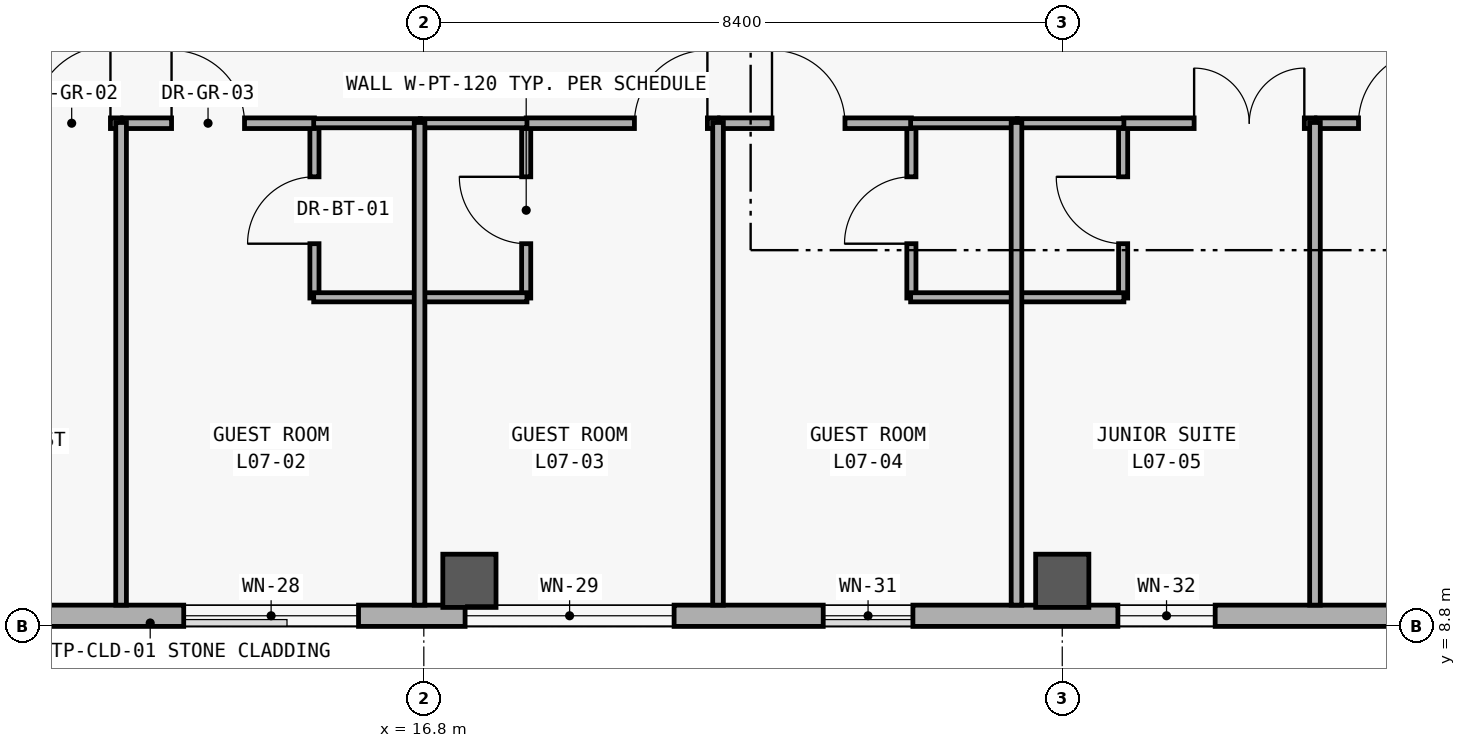
"""IFC4 building model, lengths in metres.
Left out: names, types, materials, properties, quantities, classifications, styles, units other than length and angle.
Written with IfcOpenShell. Run it as: python <this file> out.ifc"""

import sys

from ifc_helpers import new_model, si_unit, direction, frame, frame_2d, origin, origin_2d, place, context, subcontext, project, spatial, rectangle, extrude, element, fill, save


model = new_model("IFC4")
c1 = context("Model", 3, precision=1e-05, world=origin(), true_north=direction((0.0, 1.0)))
c2 = subcontext(c1, "Body", "Model", "MODEL_VIEW")
j1 = project(units=[si_unit("LENGTHUNIT", "METRE"), si_unit("PLANEANGLEUNIT", "RADIAN")], contexts=[c1])
p1 = place(None, origin())
s1 = spatial("IfcSite", under=j1, at=p1, CompositionType="ELEMENT")
p2 = place(p1, origin())
s2 = spatial("IfcBuilding", under=s1, at=p2, CompositionType="ELEMENT")
p3 = place(p2, frame((0.0, 0.0, 30.0)))
s3 = spatial("IfcBuildingStorey", under=s2, at=p3, CompositionType="ELEMENT", Elevation=30.0)
for number, where, z_axis, x_axis in (
    (1, (17.4, 9.4, 0.0), (0.0, 0.0, 1.0), (1.0, 0.0, 0.0)),
    (2, (25.2, 9.4, 0.0), (0.0, 0.0, 1.0), (1.0, 0.0, 0.0)),
):
    element("IfcColumn", number, at=place(p3, frame(where, z_axis=z_axis, x_axis=x_axis)), inside=s3, PredefinedType="COLUMN", context=c2, shape_type="SweptSolid", body=[
        extrude(rectangle(XDim=0.7, YDim=0.7, at=origin_2d()), origin(), (0.0, 0.0, 1.0), 3.6),
    ])
p4 = place(p3, frame((75.32, 8.94, 0.0), z_axis=(0.0, 0.0, 1.0), x_axis=(-1.0, 0.0, 0.0)))
e3 = element("IfcWall", 3, at=p4, inside=s3, PredefinedType="SOLIDWALL", context=c2, shape_type="SweptSolid", body=[
    extrude(rectangle(XDim=66.64, YDim=0.28, at=frame_2d((33.32, 0.0))), origin(), (0.0, 0.0, 1.0), 3.34),
])
p5 = place(p4, frame((6.47, 0.0, 0.85)))
e4 = element("IfcOpeningElement", 4, at=p5, cuts=e3, PredefinedType="OPENING", context=c2, shape_type="SweptSolid", body=[
    extrude(rectangle(XDim=2.4, YDim=1.8, at=frame_2d((1.2, 0.9))), frame((0.0, 0.15, 0.0), z_axis=(0.0, -1.0, 0.0), x_axis=(1.0, 0.0, 0.0)), (0.0, 0.0, 1.0), 0.3),
])
p6 = place(p4, frame((63.606, 0.0, 0.85)))
e5 = element("IfcOpeningElement", 5, at=p6, cuts=e3, PredefinedType="OPENING", context=c2, shape_type="SweptSolid", body=[
    extrude(rectangle(XDim=1.7, YDim=2.0, at=frame_2d((0.85, 1.0))), frame((0.0, 0.15, 0.0), z_axis=(0.0, -1.0, 0.0), x_axis=(1.0, 0.0, 0.0)), (0.0, 0.0, 1.0), 0.3),
])
p7 = place(p4, frame((59.379, 0.0, 0.85)))
e6 = element("IfcOpeningElement", 6, at=p7, cuts=e3, PredefinedType="OPENING", context=c2, shape_type="SweptSolid", body=[
    extrude(rectangle(XDim=2.3, YDim=2.05, at=frame_2d((1.15, 1.025))), frame((0.0, 0.15, 0.0), z_axis=(0.0, -1.0, 0.0), x_axis=(1.0, 0.0, 0.0)), (0.0, 0.0, 1.0), 0.3),
])
p8 = place(p4, frame((55.227, 0.0, 0.85)))
e7 = element("IfcOpeningElement", 7, at=p8, cuts=e3, PredefinedType="OPENING", context=c2, shape_type="SweptSolid", body=[
    extrude(rectangle(XDim=2.75, YDim=2.1, at=frame_2d((1.375, 1.05))), frame((0.0, 0.15, 0.0), z_axis=(0.0, -1.0, 0.0), x_axis=(1.0, 0.0, 0.0)), (0.0, 0.0, 1.0), 0.3),
])
p9 = place(p4, frame((52.085, 0.0, 0.85)))
e8 = element("IfcOpeningElement", 8, at=p9, cuts=e3, PredefinedType="OPENING", context=c2, shape_type="SweptSolid", body=[
    extrude(rectangle(XDim=1.18, YDim=1.5, at=frame_2d((0.59, 0.75))), frame((0.0, 0.15, 0.0), z_axis=(0.0, -1.0, 0.0), x_axis=(1.0, 0.0, 0.0)), (0.0, 0.0, 1.0), 0.3),
])
p10 = place(p4, frame((48.108, 0.0, 0.85)))
e9 = element("IfcOpeningElement", 9, at=p10, cuts=e3, PredefinedType="OPENING", context=c2, shape_type="SweptSolid", body=[
    extrude(rectangle(XDim=1.28, YDim=1.6, at=frame_2d((0.64, 0.8))), frame((0.0, 0.15, 0.0), z_axis=(0.0, -1.0, 0.0), x_axis=(1.0, 0.0, 0.0)), (0.0, 0.0, 1.0), 0.3),
])
p11 = place(p4, frame((44.131, 0.0, 0.85)))
e10 = element("IfcOpeningElement", 10, at=p11, cuts=e3, PredefinedType="OPENING", context=c2, shape_type="SweptSolid", body=[
    extrude(rectangle(XDim=1.38, YDim=1.7, at=frame_2d((0.69, 0.85))), frame((0.0, 0.15, 0.0), z_axis=(0.0, -1.0, 0.0), x_axis=(1.0, 0.0, 0.0)), (0.0, 0.0, 1.0), 0.3),
])
p12 = place(p4, frame((40.155, 0.0, 0.85)))
e11 = element("IfcOpeningElement", 11, at=p12, cuts=e3, PredefinedType="OPENING", context=c2, shape_type="SweptSolid", body=[
    extrude(rectangle(XDim=1.48, YDim=1.8, at=frame_2d((0.74, 0.9))), frame((0.0, 0.15, 0.0), z_axis=(0.0, -1.0, 0.0), x_axis=(1.0, 0.0, 0.0)), (0.0, 0.0, 1.0), 0.3),
])
p13 = place(p4, frame((36.178, 0.0, 0.85)))
e12 = element("IfcOpeningElement", 12, at=p13, cuts=e3, PredefinedType="OPENING", context=c2, shape_type="SweptSolid", body=[
    extrude(rectangle(XDim=1.58, YDim=1.85, at=frame_2d((0.79, 0.925))), frame((0.0, 0.15, 0.0), z_axis=(0.0, -1.0, 0.0), x_axis=(1.0, 0.0, 0.0)), (0.0, 0.0, 1.0), 0.3),
])
p14 = place(p4, frame((32.201, 0.0, 0.85)))
e13 = element("IfcOpeningElement", 13, at=p14, cuts=e3, PredefinedType="OPENING", context=c2, shape_type="SweptSolid", body=[
    extrude(rectangle(XDim=1.68, YDim=1.9, at=frame_2d((0.84, 0.95))), frame((0.0, 0.15, 0.0), z_axis=(0.0, -1.0, 0.0), x_axis=(1.0, 0.0, 0.0)), (0.0, 0.0, 1.0), 0.3),
])
p15 = place(p4, frame((28.224, 0.0, 0.85)))
e14 = element("IfcOpeningElement", 14, at=p15, cuts=e3, PredefinedType="OPENING", context=c2, shape_type="SweptSolid", body=[
    extrude(rectangle(XDim=1.78, YDim=1.95, at=frame_2d((0.89, 0.975))), frame((0.0, 0.15, 0.0), z_axis=(0.0, -1.0, 0.0), x_axis=(1.0, 0.0, 0.0)), (0.0, 0.0, 1.0), 0.3),
])
p16 = place(p4, frame((24.247, 0.0, 0.85)))
e15 = element("IfcOpeningElement", 15, at=p16, cuts=e3, PredefinedType="OPENING", context=c2, shape_type="SweptSolid", body=[
    extrude(rectangle(XDim=1.88, YDim=1.95, at=frame_2d((0.94, 0.975))), frame((0.0, 0.15, 0.0), z_axis=(0.0, -1.0, 0.0), x_axis=(1.0, 0.0, 0.0)), (0.0, 0.0, 1.0), 0.3),
])
p17 = place(p4, frame((20.235, 0.0, 0.85)))
e16 = element("IfcOpeningElement", 16, at=p17, cuts=e3, PredefinedType="OPENING", context=c2, shape_type="SweptSolid", body=[
    extrude(rectangle(XDim=2.05, YDim=1.95, at=frame_2d((1.025, 0.975))), frame((0.0, 0.15, 0.0), z_axis=(0.0, -1.0, 0.0), x_axis=(1.0, 0.0, 0.0)), (0.0, 0.0, 1.0), 0.3),
])
p18 = place(p4, frame((16.243, 0.0, 0.85)))
e17 = element("IfcOpeningElement", 17, at=p18, cuts=e3, PredefinedType="OPENING", context=c2, shape_type="SweptSolid", body=[
    extrude(rectangle(XDim=2.18, YDim=1.95, at=frame_2d((1.09, 0.975))), frame((0.0, 0.15, 0.0), z_axis=(0.0, -1.0, 0.0), x_axis=(1.0, 0.0, 0.0)), (0.0, 0.0, 1.0), 0.3),
])
p19 = place(p3, frame((15.361, 13.12, 0.0), z_axis=(0.0, 0.0, 1.0), x_axis=(0.0, 1.0, 0.0)))
e18 = element("IfcWall", 18, at=p19, inside=s3, PredefinedType="PARTITIONING", context=c2, shape_type="SweptSolid", body=[
    extrude(rectangle(XDim=2.31, YDim=0.12, at=frame_2d((1.155, 0.0))), origin(), (0.0, 0.0, 1.0), 2.48),
])
p20 = place(p19, frame((0.715, 0.0, 0.0)))
e19 = element("IfcOpeningElement", 19, at=p20, cuts=e18, PredefinedType="OPENING", context=c2, shape_type="SweptSolid", body=[
    extrude(rectangle(XDim=0.88, YDim=2.15, at=frame_2d((0.44, 1.075))), frame((0.0, 0.07, 0.0), z_axis=(0.0, -1.0, 0.0), x_axis=(1.0, 0.0, 0.0)), (0.0, 0.0, 1.0), 0.14),
])
p21 = place(p3, frame((18.147, 13.12, 0.0), z_axis=(0.0, 0.0, 1.0), x_axis=(0.0, 1.0, 0.0)))
e20 = element("IfcWall", 20, at=p21, inside=s3, PredefinedType="PARTITIONING", context=c2, shape_type="SweptSolid", body=[
    extrude(rectangle(XDim=2.31, YDim=0.12, at=frame_2d((1.155, 0.0))), origin(), (0.0, 0.0, 1.0), 2.48),
])
p22 = place(p21, frame((0.715, 0.0, 0.0)))
e21 = element("IfcOpeningElement", 21, at=p22, cuts=e20, PredefinedType="OPENING", context=c2, shape_type="SweptSolid", body=[
    extrude(rectangle(XDim=0.88, YDim=2.15, at=frame_2d((0.44, 1.075))), frame((0.0, 0.07, 0.0), z_axis=(0.0, -1.0, 0.0), x_axis=(1.0, 0.0, 0.0)), (0.0, 0.0, 1.0), 0.14),
])
p23 = place(p3, frame((23.215, 13.12, 0.0), z_axis=(0.0, 0.0, 1.0), x_axis=(0.0, 1.0, 0.0)))
e22 = element("IfcWall", 22, at=p23, inside=s3, PredefinedType="PARTITIONING", context=c2, shape_type="SweptSolid", body=[
    extrude(rectangle(XDim=2.31, YDim=0.12, at=frame_2d((1.155, 0.0))), origin(), (0.0, 0.0, 1.0), 2.48),
])
p24 = place(p23, frame((0.715, 0.0, 0.0)))
e23 = element("IfcOpeningElement", 23, at=p24, cuts=e22, PredefinedType="OPENING", context=c2, shape_type="SweptSolid", body=[
    extrude(rectangle(XDim=0.88, YDim=2.15, at=frame_2d((0.44, 1.075))), frame((0.0, 0.07, 0.0), z_axis=(0.0, -1.0, 0.0), x_axis=(1.0, 0.0, 0.0)), (0.0, 0.0, 1.0), 0.14),
])
p25 = place(p3, frame((26.001, 13.12, 0.0), z_axis=(0.0, 0.0, 1.0), x_axis=(0.0, 1.0, 0.0)))
e24 = element("IfcWall", 24, at=p25, inside=s3, PredefinedType="PARTITIONING", context=c2, shape_type="SweptSolid", body=[
    extrude(rectangle(XDim=2.31, YDim=0.12, at=frame_2d((1.155, 0.0))), origin(), (0.0, 0.0, 1.0), 2.48),
])
p26 = place(p25, frame((0.715, 0.0, 0.0)))
e25 = element("IfcOpeningElement", 25, at=p26, cuts=e24, PredefinedType="OPENING", context=c2, shape_type="SweptSolid", body=[
    extrude(rectangle(XDim=0.88, YDim=2.15, at=frame_2d((0.44, 1.075))), frame((0.0, 0.07, 0.0), z_axis=(0.0, -1.0, 0.0), x_axis=(1.0, 0.0, 0.0)), (0.0, 0.0, 1.0), 0.14),
])
p27 = place(p3, frame((10.293, 15.42, 0.0), z_axis=(0.0, 0.0, 1.0), x_axis=(1.0, 0.0, 0.0)))
e26 = element("IfcWall", 26, at=p27, inside=s3, PredefinedType="PARTITIONING", context=c2, shape_type="SweptSolid", body=[
    extrude(rectangle(XDim=2.524, YDim=0.14, at=frame_2d((1.262, 0.0))), origin(), (0.0, 0.0, 1.0), 2.48),
])
p28 = place(p27, frame((1.364, 0.0, 0.0)))
e27 = element("IfcOpeningElement", 27, at=p28, cuts=e26, PredefinedType="OPENING", context=c2, shape_type="SweptSolid", body=[
    extrude(rectangle(XDim=1.02, YDim=2.2, at=frame_2d((0.51, 1.1))), frame((0.0, 0.08, 0.0), z_axis=(0.0, -1.0, 0.0), x_axis=(1.0, 0.0, 0.0)), (0.0, 0.0, 1.0), 0.16),
])
p29 = place(p3, frame((12.837, 15.42, 0.0), z_axis=(0.0, 0.0, 1.0), x_axis=(1.0, 0.0, 0.0)))
e28 = element("IfcWall", 28, at=p29, inside=s3, PredefinedType="PARTITIONING", context=c2, shape_type="SweptSolid", body=[
    extrude(rectangle(XDim=2.524, YDim=0.14, at=frame_2d((1.262, 0.0))), origin(), (0.0, 0.0, 1.0), 2.48),
])
p30 = place(p29, frame((0.644, 0.0, 0.0)))
e29 = element("IfcOpeningElement", 29, at=p30, cuts=e28, PredefinedType="OPENING", context=c2, shape_type="SweptSolid", body=[
    extrude(rectangle(XDim=0.96, YDim=2.25, at=frame_2d((0.48, 1.125))), frame((0.0, 0.08, 0.0), z_axis=(0.0, -1.0, 0.0), x_axis=(1.0, 0.0, 0.0)), (0.0, 0.0, 1.0), 0.16),
])
p31 = place(p3, frame((18.147, 15.42, 0.0), z_axis=(0.0, 0.0, 1.0), x_axis=(1.0, 0.0, 0.0)))
e30 = element("IfcWall", 30, at=p31, inside=s3, PredefinedType="PARTITIONING", context=c2, shape_type="SweptSolid", body=[
    extrude(rectangle(XDim=2.524, YDim=0.14, at=frame_2d((1.262, 0.0))), origin(), (0.0, 0.0, 1.0), 2.48),
])
p32 = place(p31, frame((1.424, 0.0, 0.0)))
e31 = element("IfcOpeningElement", 31, at=p32, cuts=e30, PredefinedType="OPENING", context=c2, shape_type="SweptSolid", body=[
    extrude(rectangle(XDim=0.96, YDim=2.25, at=frame_2d((0.48, 1.125))), frame((0.0, 0.08, 0.0), z_axis=(0.0, -1.0, 0.0), x_axis=(1.0, 0.0, 0.0)), (0.0, 0.0, 1.0), 0.16),
])
p33 = place(p3, frame((20.691, 15.42, 0.0), z_axis=(0.0, 0.0, 1.0), x_axis=(1.0, 0.0, 0.0)))
e32 = element("IfcWall", 32, at=p33, inside=s3, PredefinedType="PARTITIONING", context=c2, shape_type="SweptSolid", body=[
    extrude(rectangle(XDim=2.524, YDim=0.14, at=frame_2d((1.262, 0.0))), origin(), (0.0, 0.0, 1.0), 2.48),
])
p34 = place(p33, frame((0.69, 0.0, 0.0)))
e33 = element("IfcOpeningElement", 33, at=p34, cuts=e32, PredefinedType="OPENING", context=c2, shape_type="SweptSolid", body=[
    extrude(rectangle(XDim=0.96, YDim=2.25, at=frame_2d((0.48, 1.125))), frame((0.0, 0.08, 0.0), z_axis=(0.0, -1.0, 0.0), x_axis=(1.0, 0.0, 0.0)), (0.0, 0.0, 1.0), 0.16),
])
p35 = place(p3, frame((26.001, 15.42, 0.0), z_axis=(0.0, 0.0, 1.0), x_axis=(1.0, 0.0, 0.0)))
e34 = element("IfcWall", 34, at=p35, inside=s3, PredefinedType="PARTITIONING", context=c2, shape_type="SweptSolid", body=[
    extrude(rectangle(XDim=2.524, YDim=0.14, at=frame_2d((1.262, 0.0))), origin(), (0.0, 0.0, 1.0), 2.48),
])
p36 = place(p35, frame((0.934, 0.0, 0.0)))
e35 = element("IfcOpeningElement", 35, at=p36, cuts=e34, PredefinedType="OPENING", context=c2, shape_type="SweptSolid", body=[
    extrude(rectangle(XDim=1.45, YDim=2.3, at=frame_2d((0.725, 1.15))), frame((0.0, 0.08, 0.0), z_axis=(0.0, -1.0, 0.0), x_axis=(1.0, 0.0, 0.0)), (0.0, 0.0, 1.0), 0.16),
])
p37 = place(p3, frame((28.545, 15.42, 0.0), z_axis=(0.0, 0.0, 1.0), x_axis=(1.0, 0.0, 0.0)))
e36 = element("IfcWall", 36, at=p37, inside=s3, PredefinedType="PARTITIONING", context=c2, shape_type="SweptSolid", body=[
    extrude(rectangle(XDim=2.524, YDim=0.14, at=frame_2d((1.262, 0.0))), origin(), (0.0, 0.0, 1.0), 2.48),
])
p38 = place(p37, frame((0.553, 0.0, 0.0)))
e37 = element("IfcOpeningElement", 37, at=p38, cuts=e36, PredefinedType="OPENING", context=c2, shape_type="SweptSolid", body=[
    extrude(rectangle(XDim=0.96, YDim=2.25, at=frame_2d((0.48, 1.125))), frame((0.0, 0.08, 0.0), z_axis=(0.0, -1.0, 0.0), x_axis=(1.0, 0.0, 0.0)), (0.0, 0.0, 1.0), 0.16),
])
for number, where, z_axis, x_axis in (
    (38, (15.351, 13.13, 0.0), (0.0, 0.0, 1.0), (1.0, 0.0, 0.0)),
    (39, (15.351, 15.42, 0.0), (0.0, 0.0, 1.0), (1.0, 0.0, 0.0)),
):
    element("IfcWall", number, at=place(p3, frame(where, z_axis=z_axis, x_axis=x_axis)), inside=s3, PredefinedType="PARTITIONING", context=c2, shape_type="SweptSolid", body=[
        extrude(rectangle(XDim=1.403, YDim=0.12, at=frame_2d((0.701, 0.0))), origin(), (0.0, 0.0, 1.0), 2.48),
    ])
for number, where, z_axis, x_axis in (
    (40, (16.754, 13.13, 0.0), (0.0, 0.0, 1.0), (1.0, 0.0, 0.0)),
    (41, (16.754, 15.42, 0.0), (0.0, 0.0, 1.0), (1.0, 0.0, 0.0)),
):
    element("IfcWall", number, at=place(p3, frame(where, z_axis=z_axis, x_axis=x_axis)), inside=s3, PredefinedType="PARTITIONING", context=c2, shape_type="SweptSolid", body=[
        extrude(rectangle(XDim=1.403, YDim=0.12, at=frame_2d((0.702, 0.0))), origin(), (0.0, 0.0, 1.0), 2.48),
    ])
for number, where, z_axis, x_axis in (
    (42, (23.205, 13.13, 0.0), (0.0, 0.0, 1.0), (1.0, 0.0, 0.0)),
    (43, (23.205, 15.42, 0.0), (0.0, 0.0, 1.0), (1.0, 0.0, 0.0)),
):
    element("IfcWall", number, at=place(p3, frame(where, z_axis=z_axis, x_axis=x_axis)), inside=s3, PredefinedType="PARTITIONING", context=c2, shape_type="SweptSolid", body=[
        extrude(rectangle(XDim=1.403, YDim=0.12, at=frame_2d((0.701, 0.0))), origin(), (0.0, 0.0, 1.0), 2.48),
    ])
for number, where, z_axis, x_axis in (
    (44, (24.608, 13.13, 0.0), (0.0, 0.0, 1.0), (1.0, 0.0, 0.0)),
    (45, (24.608, 15.42, 0.0), (0.0, 0.0, 1.0), (1.0, 0.0, 0.0)),
):
    element("IfcWall", number, at=place(p3, frame(where, z_axis=z_axis, x_axis=x_axis)), inside=s3, PredefinedType="PARTITIONING", context=c2, shape_type="SweptSolid", body=[
        extrude(rectangle(XDim=1.403, YDim=0.12, at=frame_2d((0.702, 0.0))), origin(), (0.0, 0.0, 1.0), 2.48),
    ])
for number, where, z_axis, x_axis in (
    (46, (12.817, 9.08, 0.0), (0.0, 0.0, 1.0), (0.0, 1.0, 0.0)),
    (47, (16.744, 9.08, 0.0), (0.0, 0.0, 1.0), (0.0, 1.0, 0.0)),
    (48, (20.671, 9.08, 0.0), (0.0, 0.0, 1.0), (0.0, 1.0, 0.0)),
    (49, (24.598, 9.08, 0.0), (0.0, 0.0, 1.0), (0.0, 1.0, 0.0)),
    (50, (28.525, 9.08, 0.0), (0.0, 0.0, 1.0), (0.0, 1.0, 0.0)),
):
    element("IfcWall", number, at=place(p3, frame(where, z_axis=z_axis, x_axis=x_axis)), inside=s3, PredefinedType="PARTITIONING", context=c2, shape_type="SweptSolid", body=[
        extrude(rectangle(XDim=6.35, YDim=0.14, at=frame_2d((3.175, 0.0))), origin(), (0.0, 0.0, 1.0), 2.48),
    ])
p39 = place(p7, origin())
e51 = element("IfcWindow", 51, at=p39, inside=s3, PartitioningType="SINGLE_PANEL", PredefinedType="WINDOW", context=c2, shape_type="SweptSolid", body=[
    extrude(rectangle(XDim=2.3, YDim=2.05, at=frame_2d((1.15, 1.025))), frame((0.0, 0.03, 0.0), z_axis=(0.0, -1.0, 0.0), x_axis=(1.0, 0.0, 0.0)), (0.0, 0.0, 1.0), 0.06),
])
fill(e6, e51)
p40 = place(p8, origin())
e52 = element("IfcWindow", 52, at=p40, inside=s3, PartitioningType="SINGLE_PANEL", PredefinedType="WINDOW", context=c2, shape_type="SweptSolid", body=[
    extrude(rectangle(XDim=2.75, YDim=2.1, at=frame_2d((1.375, 1.05))), frame((0.0, 0.03, 0.0), z_axis=(0.0, -1.0, 0.0), x_axis=(1.0, 0.0, 0.0)), (0.0, 0.0, 1.0), 0.06),
])
fill(e7, e52)
p41 = place(p9, origin())
e53 = element("IfcWindow", 53, at=p41, inside=s3, PartitioningType="SINGLE_PANEL", PredefinedType="WINDOW", context=c2, shape_type="SweptSolid", body=[
    extrude(rectangle(XDim=1.18, YDim=1.5, at=frame_2d((0.59, 0.75))), frame((0.0, 0.03, 0.0), z_axis=(0.0, -1.0, 0.0), x_axis=(1.0, 0.0, 0.0)), (0.0, 0.0, 1.0), 0.06),
])
fill(e8, e53)
p42 = place(p10, origin())
e54 = element("IfcWindow", 54, at=p42, inside=s3, PartitioningType="SINGLE_PANEL", PredefinedType="WINDOW", context=c2, shape_type="SweptSolid", body=[
    extrude(rectangle(XDim=1.28, YDim=1.6, at=frame_2d((0.64, 0.8))), frame((0.0, 0.03, 0.0), z_axis=(0.0, -1.0, 0.0), x_axis=(1.0, 0.0, 0.0)), (0.0, 0.0, 1.0), 0.06),
])
fill(e9, e54)
p43 = place(p20, origin())
e55 = element("IfcDoor", 55, at=p43, inside=s3, OperationType="SINGLE_SWING_LEFT", PredefinedType="DOOR", context=c2, shape_type="SweptSolid", body=[
    extrude(rectangle(XDim=0.88, YDim=2.15, at=frame_2d((0.44, 1.075))), frame((0.0, 0.025, 0.0), z_axis=(0.0, -1.0, 0.0), x_axis=(1.0, 0.0, 0.0)), (0.0, 0.0, 1.0), 0.05),
])
fill(e19, e55)
p44 = place(p22, origin())
e56 = element("IfcDoor", 56, at=p44, inside=s3, OperationType="SINGLE_SWING_RIGHT", PredefinedType="DOOR", context=c2, shape_type="SweptSolid", body=[
    extrude(rectangle(XDim=0.88, YDim=2.15, at=frame_2d((0.44, 1.075))), frame((0.0, 0.025, 0.0), z_axis=(0.0, -1.0, 0.0), x_axis=(1.0, 0.0, 0.0)), (0.0, 0.0, 1.0), 0.05),
])
fill(e21, e56)
p45 = place(p24, origin())
e57 = element("IfcDoor", 57, at=p45, inside=s3, OperationType="SINGLE_SWING_LEFT", PredefinedType="DOOR", context=c2, shape_type="SweptSolid", body=[
    extrude(rectangle(XDim=0.88, YDim=2.15, at=frame_2d((0.44, 1.075))), frame((0.0, 0.025, 0.0), z_axis=(0.0, -1.0, 0.0), x_axis=(1.0, 0.0, 0.0)), (0.0, 0.0, 1.0), 0.05),
])
fill(e23, e57)
p46 = place(p26, origin())
e58 = element("IfcDoor", 58, at=p46, inside=s3, OperationType="SINGLE_SWING_RIGHT", PredefinedType="DOOR", context=c2, shape_type="SweptSolid", body=[
    extrude(rectangle(XDim=0.88, YDim=2.15, at=frame_2d((0.44, 1.075))), frame((0.0, 0.025, 0.0), z_axis=(0.0, -1.0, 0.0), x_axis=(1.0, 0.0, 0.0)), (0.0, 0.0, 1.0), 0.05),
])
fill(e25, e58)
p47 = place(p28, origin())
e59 = element("IfcDoor", 59, at=p47, inside=s3, OperationType="SINGLE_SWING_RIGHT", PredefinedType="DOOR", context=c2, shape_type="SweptSolid", body=[
    extrude(rectangle(XDim=1.02, YDim=2.2, at=frame_2d((0.51, 1.1))), frame((0.0, 0.025, 0.0), z_axis=(0.0, -1.0, 0.0), x_axis=(1.0, 0.0, 0.0)), (0.0, 0.0, 1.0), 0.05),
])
fill(e27, e59)
p48 = place(p30, origin())
e60 = element("IfcDoor", 60, at=p48, inside=s3, OperationType="SINGLE_SWING_LEFT", PredefinedType="DOOR", context=c2, shape_type="SweptSolid", body=[
    extrude(rectangle(XDim=0.96, YDim=2.25, at=frame_2d((0.48, 1.125))), frame((0.0, 0.025, 0.0), z_axis=(0.0, -1.0, 0.0), x_axis=(1.0, 0.0, 0.0)), (0.0, 0.0, 1.0), 0.05),
])
fill(e29, e60)
p49 = place(p32, origin())
e61 = element("IfcDoor", 61, at=p49, inside=s3, OperationType="SINGLE_SWING_RIGHT", PredefinedType="DOOR", context=c2, shape_type="SweptSolid", body=[
    extrude(rectangle(XDim=0.96, YDim=2.25, at=frame_2d((0.48, 1.125))), frame((0.0, 0.025, 0.0), z_axis=(0.0, -1.0, 0.0), x_axis=(1.0, 0.0, 0.0)), (0.0, 0.0, 1.0), 0.05),
])
fill(e31, e61)
p50 = place(p34, origin())
e62 = element("IfcDoor", 62, at=p50, inside=s3, OperationType="SINGLE_SWING_LEFT", PredefinedType="DOOR", context=c2, shape_type="SweptSolid", body=[
    extrude(rectangle(XDim=0.96, YDim=2.25, at=frame_2d((0.48, 1.125))), frame((0.0, 0.025, 0.0), z_axis=(0.0, -1.0, 0.0), x_axis=(1.0, 0.0, 0.0)), (0.0, 0.0, 1.0), 0.05),
])
fill(e33, e62)
p51 = place(p36, origin())
e63 = element("IfcDoor", 63, at=p51, inside=s3, OperationType="DOUBLE_DOOR_SINGLE_SWING", PredefinedType="DOOR", context=c2, shape_type="SweptSolid", body=[
    extrude(rectangle(XDim=1.45, YDim=2.3, at=frame_2d((0.725, 1.15))), frame((0.0, 0.025, 0.0), z_axis=(0.0, -1.0, 0.0), x_axis=(1.0, 0.0, 0.0)), (0.0, 0.0, 1.0), 0.05),
])
fill(e35, e63)
p52 = place(p38, origin())
e64 = element("IfcDoor", 64, at=p52, inside=s3, OperationType="SINGLE_SWING_RIGHT", PredefinedType="DOOR", context=c2, shape_type="SweptSolid", body=[
    extrude(rectangle(XDim=0.96, YDim=2.25, at=frame_2d((0.48, 1.125))), frame((0.0, 0.025, 0.0), z_axis=(0.0, -1.0, 0.0), x_axis=(1.0, 0.0, 0.0)), (0.0, 0.0, 1.0), 0.05),
])
fill(e37, e64)
save(model, sys.argv[1])
